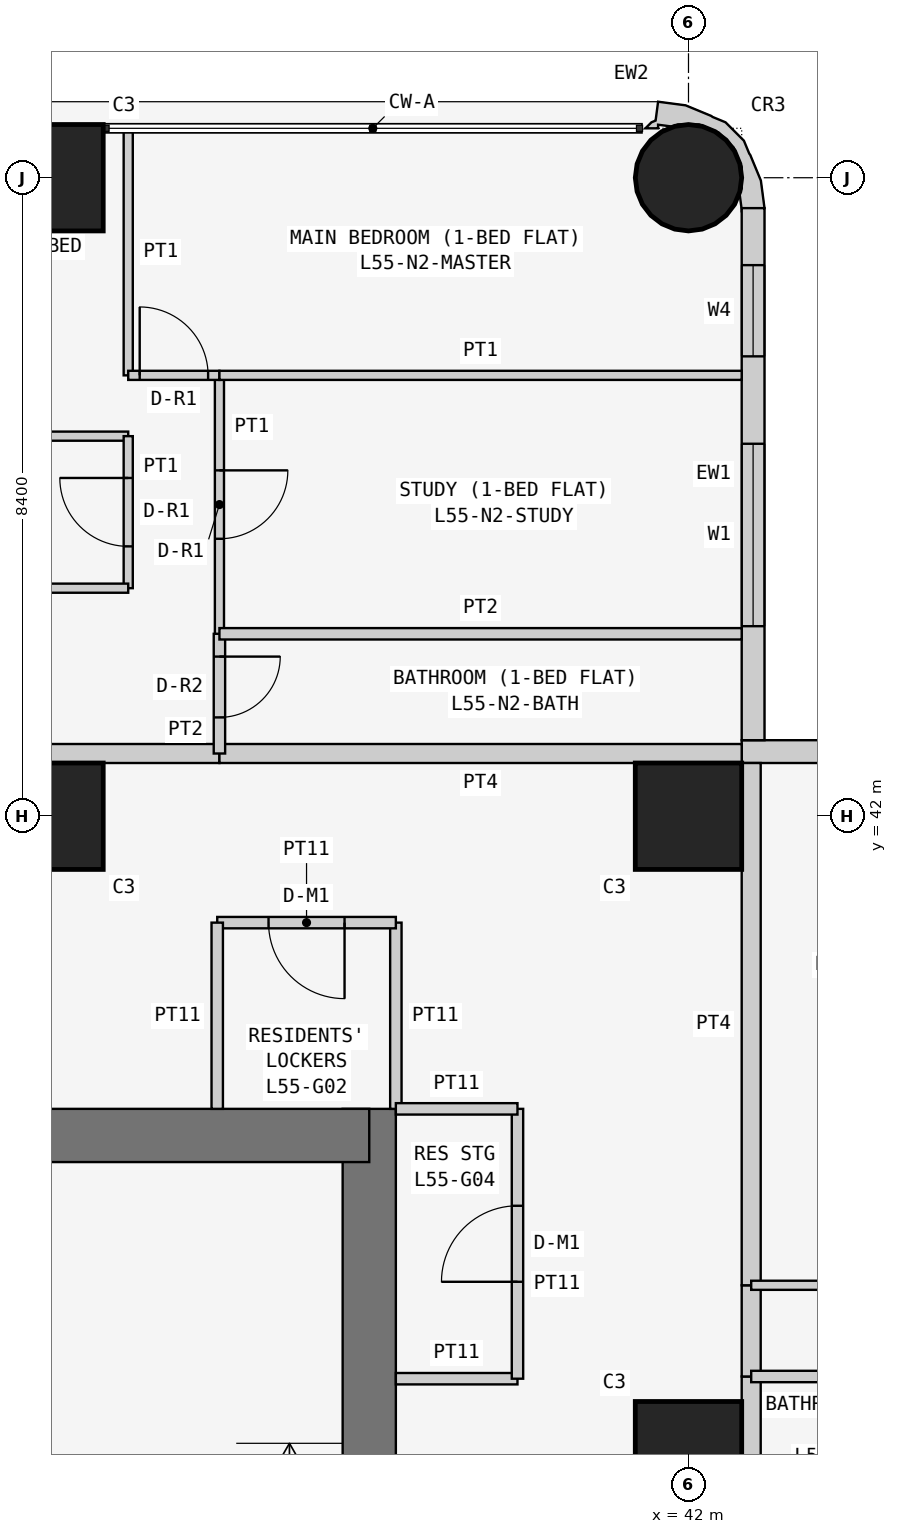
"""IFC4 building model, lengths in metres.
Left out: names, types, materials, properties, quantities, classifications, styles, units other than length and angle.
Written with IfcOpenShell. Run it as: python <this file> out.ifc"""

import sys

from ifc_helpers import new_model, si_unit, direction, frame, frame_2d, origin, origin_2d, place, context, subcontext, project, spatial, polyline, rectangle, circle, outline, extrude, element, fill, save


model = new_model("IFC4")
c1 = context("Model", 3, precision=1e-05, world=origin(), true_north=direction((0.0, 1.0)))
c2 = subcontext(c1, "Body", "Model", "MODEL_VIEW")
j1 = project(units=[si_unit("LENGTHUNIT", "METRE"), si_unit("PLANEANGLEUNIT", "RADIAN")], contexts=[c1])
p1 = place(None, origin())
s1 = spatial("IfcSite", under=j1, at=p1, CompositionType="ELEMENT")
p2 = place(p1, origin())
s2 = spatial("IfcBuilding", under=s1, at=p2, CompositionType="ELEMENT")
p3 = place(p2, frame((0.0, 0.0, 212.1)))
s3 = spatial("IfcBuildingStorey", under=s2, at=p3, CompositionType="ELEMENT", Elevation=212.1)
for number, where, z_axis, x_axis in (
    (1, (33.6, 42.0, 0.0), (0.0, 0.0, 1.0), (1.0, 0.0, 0.0)),
    (2, (33.6, 50.4, 0.0), (0.0, 0.0, 1.0), (1.0, 0.0, 0.0)),
    (3, (42.0, 33.6, 0.0), (0.0, 0.0, 1.0), (1.0, 0.0, 0.0)),
    (4, (42.0, 42.0, 0.0), (0.0, 0.0, 1.0), (1.0, 0.0, 0.0)),
):
    element("IfcColumn", number, at=place(p3, frame(where, z_axis=z_axis, x_axis=x_axis)), inside=s3, PredefinedType="COLUMN", context=c2, shape_type="SweptSolid", body=[
        extrude(rectangle(XDim=1.4, YDim=1.4, at=origin_2d()), origin(), (0.0, 0.0, 1.0), 3.6),
    ])
p4 = place(p3, frame((42.0, 50.4, 0.0), z_axis=(0.0, 0.0, 1.0), x_axis=(1.0, 0.0, 0.0)))
e5 = element("IfcColumn", 5, at=p4, inside=s3, PredefinedType="COLUMN", context=c2, shape_type="SweptSolid", body=[
    extrude(circle(Radius=0.7, at=origin_2d()), origin(), (0.0, 0.0, 1.0), 3.6),
])
p5 = place(p3, frame((37.8, 21.0, 0.0), z_axis=(0.0, 0.0, 1.0), x_axis=(0.0, 1.0, 0.0)))
e6 = element("IfcWall", 6, at=p5, inside=s3, PredefinedType="SHEAR", context=c2, shape_type="SweptSolid", body=[
    extrude(rectangle(XDim=17.15, YDim=0.7, at=frame_2d((8.575, 0.0))), origin(), (0.0, 0.0, 1.0), 3.6),
])
p6 = place(p5, frame((5.2, 0.0, 0.0)))
e7 = element("IfcOpeningElement", 7, at=p6, cuts=e6, PredefinedType="OPENING", context=c2, shape_type="SweptSolid", body=[
    extrude(rectangle(XDim=1.2, YDim=2.1, at=frame_2d((0.6, 1.05))), frame((0.0, 0.36, 0.0), z_axis=(0.0, -1.0, 0.0), x_axis=(1.0, 0.0, 0.0)), (0.0, 0.0, 1.0), 0.72),
])
p7 = place(p3, frame((37.8, 37.8, 0.0), z_axis=(0.0, 0.0, 1.0), x_axis=(-1.0, 0.0, 0.0)))
e8 = element("IfcWall", 8, at=p7, inside=s3, PredefinedType="SHEAR", context=c2, shape_type="SweptSolid", body=[
    extrude(rectangle(XDim=17.15, YDim=0.7, at=frame_2d((8.575, 0.0))), origin(), (0.0, 0.0, 1.0), 3.6),
])
p8 = place(p3, frame((50.0, 42.85, 0.0), z_axis=(0.0, 0.0, 1.0), x_axis=(-1.0, 0.0, 0.0)))
e9 = element("IfcWall", 9, at=p8, inside=s3, PredefinedType="SOLIDWALL", context=c2, shape_type="SweptSolid", body=[
    extrude(rectangle(XDim=7.3, YDim=0.3, at=frame_2d((3.65, 0.0))), origin(), (0.0, 0.0, 1.0), 3.45),
])
p9 = place(p8, frame((3.1, 0.0, 0.9)))
e10 = element("IfcOpeningElement", 10, at=p9, cuts=e9, PredefinedType="OPENING", context=c2, shape_type="SweptSolid", body=[
    extrude(rectangle(XDim=2.4, YDim=1.5, at=frame_2d((1.2, 0.75))), frame((0.0, 0.16, 0.0), z_axis=(0.0, -1.0, 0.0), x_axis=(1.0, 0.0, 0.0)), (0.0, 0.0, 1.0), 0.32),
])
p10 = place(p8, frame((0.75, 0.0, 0.9)))
e11 = element("IfcOpeningElement", 11, at=p10, cuts=e9, PredefinedType="OPENING", context=c2, shape_type="SweptSolid", body=[
    extrude(rectangle(XDim=1.2, YDim=1.5, at=frame_2d((0.6, 0.75))), frame((0.0, 0.16, 0.0), z_axis=(0.0, -1.0, 0.0), x_axis=(1.0, 0.0, 0.0)), (0.0, 0.0, 1.0), 0.32),
])
p11 = place(p3, frame((42.85, 43.0, 0.0), z_axis=(0.0, 0.0, 1.0), x_axis=(0.0, 1.0, 0.0)))
e12 = element("IfcWall", 12, at=p11, inside=s3, PredefinedType="SOLIDWALL", context=c2, shape_type="SweptSolid", body=[
    extrude(rectangle(XDim=7.0, YDim=0.3, at=frame_2d((3.5, 0.0))), origin(), (0.0, 0.0, 1.0), 3.45),
])
p12 = place(p11, frame((1.5, 0.0, 0.9)))
e13 = element("IfcOpeningElement", 13, at=p12, cuts=e12, PredefinedType="OPENING", context=c2, shape_type="SweptSolid", body=[
    extrude(rectangle(XDim=2.4, YDim=1.5, at=frame_2d((1.2, 0.75))), frame((0.0, 0.16, 0.0), z_axis=(0.0, -1.0, 0.0), x_axis=(1.0, 0.0, 0.0)), (0.0, 0.0, 1.0), 0.32),
])
p13 = place(p11, frame((5.05, 0.0, 0.9)))
e14 = element("IfcOpeningElement", 14, at=p13, cuts=e12, PredefinedType="OPENING", context=c2, shape_type="SweptSolid", body=[
    extrude(rectangle(XDim=1.2, YDim=1.5, at=frame_2d((0.6, 0.75))), frame((0.0, 0.16, 0.0), z_axis=(0.0, -1.0, 0.0), x_axis=(1.0, 0.0, 0.0)), (0.0, 0.0, 1.0), 0.32),
])
p14 = place(p3, frame((42.724, 50.11, 0.0), z_axis=(0.0, 0.0, 1.0), x_axis=(0.439933741929, 0.898030234854, 0.0)))
e15 = element("IfcWall", 15, at=p14, inside=s3, PredefinedType="SOLIDWALL", context=c2, shape_type="SweptSolid", body=[
    extrude(outline(polyline([(-0.145, -0.044), (0.022, -0.296), (0.327, -0.094), (0.568, 0.18), (0.577, 0.199), (0.7, 0.337), (0.811, 0.661), (0.799, 0.845), (0.803, 0.866), (0.78, 1.231), (0.664, 1.577), (0.426, 1.497), (0.382, 1.536), (0.276, 1.572), (0.349, 1.423), (0.392, 1.444), (0.453, 1.261), (0.51, 1.211), (0.632, 0.961), (0.65, 0.683), (0.56, 0.419), (0.375, 0.21), (0.125, 0.087), (0.05, 0.082), (-0.127, -0.035), (-0.145, -0.044)])), origin(), (0.0, 0.0, 1.0), 3.45),
])
p15 = place(p3, frame((38.15, 38.15, 0.0), z_axis=(0.0, 0.0, 1.0), x_axis=(0.0, 1.0, 0.0)))
e16 = element("IfcWall", 16, at=p15, inside=s3, PredefinedType="PARTITIONING", context=c2, shape_type="SweptSolid", body=[
    extrude(rectangle(XDim=2.45, YDim=0.15, at=frame_2d((1.225, 0.0))), origin(), (0.0, 0.0, 1.0), 3.45),
])
p16 = place(p3, frame((38.15, 40.6, 0.0), z_axis=(0.0, 0.0, 1.0), x_axis=(-1.0, 0.0, 0.0)))
e17 = element("IfcWall", 17, at=p16, inside=s3, PredefinedType="PARTITIONING", context=c2, shape_type="SweptSolid", body=[
    extrude(rectangle(XDim=2.35, YDim=0.15, at=frame_2d((1.175, 0.0))), origin(), (0.0, 0.0, 1.0), 3.45),
])
p17 = place(p16, frame((0.675, 0.0, 0.0)))
e18 = element("IfcOpeningElement", 18, at=p17, cuts=e17, PredefinedType="OPENING", context=c2, shape_type="SweptSolid", body=[
    extrude(rectangle(XDim=1.0, YDim=2.1, at=frame_2d((0.5, 1.05))), frame((0.0, 0.085, 0.0), z_axis=(0.0, -1.0, 0.0), x_axis=(1.0, 0.0, 0.0)), (0.0, 0.0, 1.0), 0.17),
])
p18 = place(p3, frame((35.8, 40.6, 0.0), z_axis=(0.0, 0.0, 1.0), x_axis=(0.0, -1.0, 0.0)))
e19 = element("IfcWall", 19, at=p18, inside=s3, PredefinedType="PARTITIONING", context=c2, shape_type="SweptSolid", body=[
    extrude(rectangle(XDim=2.45, YDim=0.15, at=frame_2d((1.225, 0.0))), origin(), (0.0, 0.0, 1.0), 3.45),
])
p19 = place(p3, frame((38.15, 34.6, 0.0), z_axis=(0.0, 0.0, 1.0), x_axis=(1.0, 0.0, 0.0)))
e20 = element("IfcWall", 20, at=p19, inside=s3, PredefinedType="PARTITIONING", context=c2, shape_type="SweptSolid", body=[
    extrude(rectangle(XDim=1.6, YDim=0.15, at=frame_2d((0.8, 0.0))), origin(), (0.0, 0.0, 1.0), 3.45),
])
p20 = place(p3, frame((39.75, 34.6, 0.0), z_axis=(0.0, 0.0, 1.0), x_axis=(0.0, 1.0, 0.0)))
e21 = element("IfcWall", 21, at=p20, inside=s3, PredefinedType="PARTITIONING", context=c2, shape_type="SweptSolid", body=[
    extrude(rectangle(XDim=3.55, YDim=0.15, at=frame_2d((1.775, 0.0))), origin(), (0.0, 0.0, 1.0), 3.45),
])
p21 = place(p20, frame((1.275, 0.0, 0.0)))
e22 = element("IfcOpeningElement", 22, at=p21, cuts=e21, PredefinedType="OPENING", context=c2, shape_type="SweptSolid", body=[
    extrude(rectangle(XDim=1.0, YDim=2.1, at=frame_2d((0.5, 1.05))), frame((0.0, 0.085, 0.0), z_axis=(0.0, -1.0, 0.0), x_axis=(1.0, 0.0, 0.0)), (0.0, 0.0, 1.0), 0.17),
])
p22 = place(p3, frame((39.75, 38.15, 0.0), z_axis=(0.0, 0.0, 1.0), x_axis=(-1.0, 0.0, 0.0)))
e23 = element("IfcWall", 23, at=p22, inside=s3, PredefinedType="PARTITIONING", context=c2, shape_type="SweptSolid", body=[
    extrude(rectangle(XDim=1.6, YDim=0.15, at=frame_2d((0.8, 0.0))), origin(), (0.0, 0.0, 1.0), 3.45),
])
p23 = place(p3, frame((29.4, 42.825, 0.0), z_axis=(0.0, 0.0, 1.0), x_axis=(1.0, 0.0, 0.0)))
e24 = element("IfcWall", 24, at=p23, inside=s3, PredefinedType="PARTITIONING", context=c2, shape_type="SweptSolid", body=[
    extrude(rectangle(XDim=6.429, YDim=0.25, at=frame_2d((3.215, 0.0))), origin(), (0.0, 0.0, 1.0), 3.45),
])
p24 = place(p23, frame((0.5, 0.0, 0.0)))
e25 = element("IfcOpeningElement", 25, at=p24, cuts=e24, PredefinedType="OPENING", context=c2, shape_type="SweptSolid", body=[
    extrude(rectangle(XDim=1.0, YDim=2.1, at=frame_2d((0.5, 1.05))), frame((0.0, 0.135, 0.0), z_axis=(0.0, -1.0, 0.0), x_axis=(1.0, 0.0, 0.0)), (0.0, 0.0, 1.0), 0.27),
])
p25 = place(p3, frame((35.829, 42.825, 0.0), z_axis=(0.0, 0.0, 1.0), x_axis=(1.0, 0.0, 0.0)))
e26 = element("IfcWall", 26, at=p25, inside=s3, PredefinedType="PARTITIONING", context=c2, shape_type="SweptSolid", body=[
    extrude(rectangle(XDim=6.871, YDim=0.25, at=frame_2d((3.436, 0.0))), origin(), (0.0, 0.0, 1.0), 3.45),
])
p26 = place(p3, frame((42.825, 34.629, 0.0), z_axis=(0.0, 0.0, 1.0), x_axis=(0.0, -1.0, 0.0)))
e27 = element("IfcWall", 27, at=p26, inside=s3, PredefinedType="PARTITIONING", context=c2, shape_type="SweptSolid", body=[
    extrude(rectangle(XDim=2.629, YDim=0.25, at=frame_2d((1.314, 0.0))), origin(), (0.0, 0.0, 1.0), 3.45),
])
p27 = place(p3, frame((42.825, 35.829, 0.0), z_axis=(0.0, 0.0, 1.0), x_axis=(0.0, -1.0, 0.0)))
e28 = element("IfcWall", 28, at=p27, inside=s3, PredefinedType="PARTITIONING", context=c2, shape_type="SweptSolid", body=[
    extrude(rectangle(XDim=1.2, YDim=0.25, at=frame_2d((0.6, 0.0))), origin(), (0.0, 0.0, 1.0), 3.45),
])
p28 = place(p3, frame((42.825, 42.7, 0.0), z_axis=(0.0, 0.0, 1.0), x_axis=(0.0, -1.0, 0.0)))
e29 = element("IfcWall", 29, at=p28, inside=s3, PredefinedType="PARTITIONING", context=c2, shape_type="SweptSolid", body=[
    extrude(rectangle(XDim=6.871, YDim=0.25, at=frame_2d((3.436, 0.0))), origin(), (0.0, 0.0, 1.0), 3.45),
])
p29 = place(p3, frame((29.4, 47.0, 0.0), z_axis=(0.0, 0.0, 1.0), x_axis=(1.0, 0.0, 0.0)))
e30 = element("IfcWall", 30, at=p29, inside=s3, PredefinedType="PARTITIONING", context=c2, shape_type="SweptSolid", body=[
    extrude(rectangle(XDim=5.229, YDim=0.12, at=frame_2d((2.615, 0.0))), origin(), (0.0, 0.0, 1.0), 3.45),
])
p30 = place(p3, frame((34.629, 47.0, 0.0), z_axis=(0.0, 0.0, 1.0), x_axis=(0.0, -1.0, 0.0)))
e31 = element("IfcWall", 31, at=p30, inside=s3, PredefinedType="PARTITIONING", context=c2, shape_type="SweptSolid", body=[
    extrude(rectangle(XDim=2.0, YDim=0.12, at=frame_2d((1.0, 0.0))), origin(), (0.0, 0.0, 1.0), 3.45),
])
p31 = place(p30, frame((0.55, 0.0, 0.0)))
e32 = element("IfcOpeningElement", 32, at=p31, cuts=e31, PredefinedType="OPENING", context=c2, shape_type="SweptSolid", body=[
    extrude(rectangle(XDim=0.9, YDim=2.1, at=frame_2d((0.45, 1.05))), frame((0.0, 0.07, 0.0), z_axis=(0.0, -1.0, 0.0), x_axis=(1.0, 0.0, 0.0)), (0.0, 0.0, 1.0), 0.14),
])
p32 = place(p3, frame((34.629, 45.0, 0.0), z_axis=(0.0, 0.0, 1.0), x_axis=(-1.0, 0.0, 0.0)))
e33 = element("IfcWall", 33, at=p32, inside=s3, PredefinedType="PARTITIONING", context=c2, shape_type="SweptSolid", body=[
    extrude(rectangle(XDim=5.229, YDim=0.12, at=frame_2d((2.615, 0.0))), origin(), (0.0, 0.0, 1.0), 3.45),
])
p33 = place(p3, frame((35.829, 44.4, 0.0), z_axis=(0.0, 0.0, 1.0), x_axis=(0.0, -1.0, 0.0)))
e34 = element("IfcWall", 34, at=p33, inside=s3, PredefinedType="PARTITIONING", context=c2, shape_type="SweptSolid", body=[
    extrude(rectangle(XDim=1.575, YDim=0.15, at=frame_2d((0.788, 0.0))), origin(), (0.0, 0.0, 1.0), 3.45),
])
p34 = place(p33, frame((0.3, 0.0, 0.0)))
e35 = element("IfcOpeningElement", 35, at=p34, cuts=e34, PredefinedType="OPENING", context=c2, shape_type="SweptSolid", body=[
    extrude(rectangle(XDim=0.8, YDim=2.1, at=frame_2d((0.4, 1.05))), frame((0.0, 0.085, 0.0), z_axis=(0.0, -1.0, 0.0), x_axis=(1.0, 0.0, 0.0)), (0.0, 0.0, 1.0), 0.17),
])
p35 = place(p3, frame((35.829, 47.8, 0.0), z_axis=(0.0, 0.0, 1.0), x_axis=(0.0, -1.0, 0.0)))
e36 = element("IfcWall", 36, at=p35, inside=s3, PredefinedType="PARTITIONING", context=c2, shape_type="SweptSolid", body=[
    extrude(rectangle(XDim=3.4, YDim=0.12, at=frame_2d((1.7, 0.0))), origin(), (0.0, 0.0, 1.0), 3.45),
])
p36 = place(p35, frame((1.25, 0.0, 0.0)))
e37 = element("IfcOpeningElement", 37, at=p36, cuts=e36, PredefinedType="OPENING", context=c2, shape_type="SweptSolid", body=[
    extrude(rectangle(XDim=0.9, YDim=2.1, at=frame_2d((0.45, 1.05))), frame((0.0, 0.07, 0.0), z_axis=(0.0, -1.0, 0.0), x_axis=(1.0, 0.0, 0.0)), (0.0, 0.0, 1.0), 0.14),
])
p37 = place(p3, frame((34.629, 51.05, 0.0), z_axis=(0.0, 0.0, 1.0), x_axis=(0.0, -1.0, 0.0)))
e38 = element("IfcWall", 38, at=p37, inside=s3, PredefinedType="PARTITIONING", context=c2, shape_type="SweptSolid", body=[
    extrude(rectangle(XDim=3.25, YDim=0.12, at=frame_2d((1.625, 0.0))), origin(), (0.0, 0.0, 1.0), 3.45),
])
p38 = place(p3, frame((34.629, 47.8, 0.0), z_axis=(0.0, 0.0, 1.0), x_axis=(1.0, 0.0, 0.0)))
e39 = element("IfcWall", 39, at=p38, inside=s3, PredefinedType="PARTITIONING", context=c2, shape_type="SweptSolid", body=[
    extrude(rectangle(XDim=1.2, YDim=0.12, at=frame_2d((0.6, 0.0))), origin(), (0.0, 0.0, 1.0), 3.45),
])
p39 = place(p38, frame((0.151, 0.0, 0.0)))
e40 = element("IfcOpeningElement", 40, at=p39, cuts=e39, PredefinedType="OPENING", context=c2, shape_type="SweptSolid", body=[
    extrude(rectangle(XDim=0.9, YDim=2.1, at=frame_2d((0.45, 1.05))), frame((0.0, 0.07, 0.0), z_axis=(0.0, -1.0, 0.0), x_axis=(1.0, 0.0, 0.0)), (0.0, 0.0, 1.0), 0.14),
])
p40 = place(p3, frame((35.829, 44.4, 0.0), z_axis=(0.0, 0.0, 1.0), x_axis=(1.0, 0.0, 0.0)))
e41 = element("IfcWall", 41, at=p40, inside=s3, PredefinedType="PARTITIONING", context=c2, shape_type="SweptSolid", body=[
    extrude(rectangle(XDim=6.871, YDim=0.15, at=frame_2d((3.436, 0.0))), origin(), (0.0, 0.0, 1.0), 3.45),
])
p41 = place(p3, frame((35.829, 47.8, 0.0), z_axis=(0.0, 0.0, 1.0), x_axis=(1.0, 0.0, 0.0)))
e42 = element("IfcWall", 42, at=p41, inside=s3, PredefinedType="PARTITIONING", context=c2, shape_type="SweptSolid", body=[
    extrude(rectangle(XDim=6.871, YDim=0.12, at=frame_2d((3.436, 0.0))), origin(), (0.0, 0.0, 1.0), 3.45),
])
p42 = place(p3, frame((46.0, 34.629, 0.0), z_axis=(0.0, 0.0, 1.0), x_axis=(-1.0, 0.0, 0.0)))
e43 = element("IfcWall", 43, at=p42, inside=s3, PredefinedType="PARTITIONING", context=c2, shape_type="SweptSolid", body=[
    extrude(rectangle(XDim=3.175, YDim=0.15, at=frame_2d((1.587, 0.0))), origin(), (0.0, 0.0, 1.0), 3.45),
])
p43 = place(p3, frame((42.825, 35.829, 0.0), z_axis=(0.0, 0.0, 1.0), x_axis=(1.0, 0.0, 0.0)))
e44 = element("IfcWall", 44, at=p43, inside=s3, PredefinedType="PARTITIONING", context=c2, shape_type="SweptSolid", body=[
    extrude(rectangle(XDim=4.975, YDim=0.12, at=frame_2d((2.488, 0.0))), origin(), (0.0, 0.0, 1.0), 3.45),
])
p44 = place(p43, frame((2.125, 0.0, 0.0)))
e45 = element("IfcOpeningElement", 45, at=p44, cuts=e44, PredefinedType="OPENING", context=c2, shape_type="SweptSolid", body=[
    extrude(rectangle(XDim=0.9, YDim=2.1, at=frame_2d((0.45, 1.05))), frame((0.0, 0.07, 0.0), z_axis=(0.0, -1.0, 0.0), x_axis=(1.0, 0.0, 0.0)), (0.0, 0.0, 1.0), 0.14),
])
p45 = place(p12, origin())
e46 = element("IfcWindow", 46, at=p45, inside=s3, PartitioningType="SINGLE_PANEL", PredefinedType="WINDOW", context=c2, shape_type="SweptSolid", body=[
    extrude(rectangle(XDim=2.4, YDim=1.5, at=frame_2d((1.2, 0.75))), frame((0.0, 0.03, 0.0), z_axis=(0.0, -1.0, 0.0), x_axis=(1.0, 0.0, 0.0)), (0.0, 0.0, 1.0), 0.06),
])
fill(e13, e46)
p46 = place(p13, origin())
e47 = element("IfcWindow", 47, at=p46, inside=s3, PartitioningType="SINGLE_PANEL", PredefinedType="WINDOW", context=c2, shape_type="SweptSolid", body=[
    extrude(rectangle(XDim=1.2, YDim=1.5, at=frame_2d((0.6, 0.75))), frame((0.0, 0.03, 0.0), z_axis=(0.0, -1.0, 0.0), x_axis=(1.0, 0.0, 0.0)), (0.0, 0.0, 1.0), 0.06),
])
fill(e14, e47)
p47 = place(p17, origin())
e48 = element("IfcDoor", 48, at=p47, inside=s3, OperationType="SINGLE_SWING_LEFT", PredefinedType="DOOR", context=c2, shape_type="SweptSolid", body=[
    extrude(rectangle(XDim=1.0, YDim=2.1, at=frame_2d((0.5, 1.05))), frame((0.0, 0.025, 0.0), z_axis=(0.0, -1.0, 0.0), x_axis=(1.0, 0.0, 0.0)), (0.0, 0.0, 1.0), 0.05),
])
fill(e18, e48)
p48 = place(p21, origin())
e49 = element("IfcDoor", 49, at=p48, inside=s3, OperationType="SINGLE_SWING_LEFT", PredefinedType="DOOR", context=c2, shape_type="SweptSolid", body=[
    extrude(rectangle(XDim=1.0, YDim=2.1, at=frame_2d((0.5, 1.05))), frame((0.0, 0.025, 0.0), z_axis=(0.0, -1.0, 0.0), x_axis=(1.0, 0.0, 0.0)), (0.0, 0.0, 1.0), 0.05),
])
fill(e22, e49)
p49 = place(p31, frame((0.9, 0.0, 0.0), z_axis=(0.0, 0.0, 1.0), x_axis=(-1.0, 0.0, 0.0)))
e50 = element("IfcDoor", 50, at=p49, inside=s3, OperationType="SINGLE_SWING_RIGHT", PredefinedType="DOOR", context=c2, shape_type="SweptSolid", body=[
    extrude(rectangle(XDim=0.9, YDim=2.1, at=frame_2d((0.45, 1.05))), frame((0.0, 0.025, 0.0), z_axis=(0.0, -1.0, 0.0), x_axis=(1.0, 0.0, 0.0)), (0.0, 0.0, 1.0), 0.05),
])
fill(e32, e50)
p50 = place(p34, origin())
e51 = element("IfcDoor", 51, at=p50, inside=s3, OperationType="SINGLE_SWING_LEFT", PredefinedType="DOOR", context=c2, shape_type="SweptSolid", body=[
    extrude(rectangle(XDim=0.8, YDim=2.1, at=frame_2d((0.4, 1.05))), frame((0.0, 0.025, 0.0), z_axis=(0.0, -1.0, 0.0), x_axis=(1.0, 0.0, 0.0)), (0.0, 0.0, 1.0), 0.05),
])
fill(e35, e51)
p51 = place(p36, origin())
e52 = element("IfcDoor", 52, at=p51, inside=s3, OperationType="SINGLE_SWING_LEFT", PredefinedType="DOOR", context=c2, shape_type="SweptSolid", body=[
    extrude(rectangle(XDim=0.9, YDim=2.1, at=frame_2d((0.45, 1.05))), frame((0.0, 0.025, 0.0), z_axis=(0.0, -1.0, 0.0), x_axis=(1.0, 0.0, 0.0)), (0.0, 0.0, 1.0), 0.05),
])
fill(e37, e52)
p52 = place(p39, origin())
e53 = element("IfcDoor", 53, at=p52, inside=s3, OperationType="SINGLE_SWING_LEFT", PredefinedType="DOOR", context=c2, shape_type="SweptSolid", body=[
    extrude(rectangle(XDim=0.9, YDim=2.1, at=frame_2d((0.45, 1.05))), frame((0.0, 0.025, 0.0), z_axis=(0.0, -1.0, 0.0), x_axis=(1.0, 0.0, 0.0)), (0.0, 0.0, 1.0), 0.05),
])
fill(e40, e53)
save(model, sys.argv[1])
